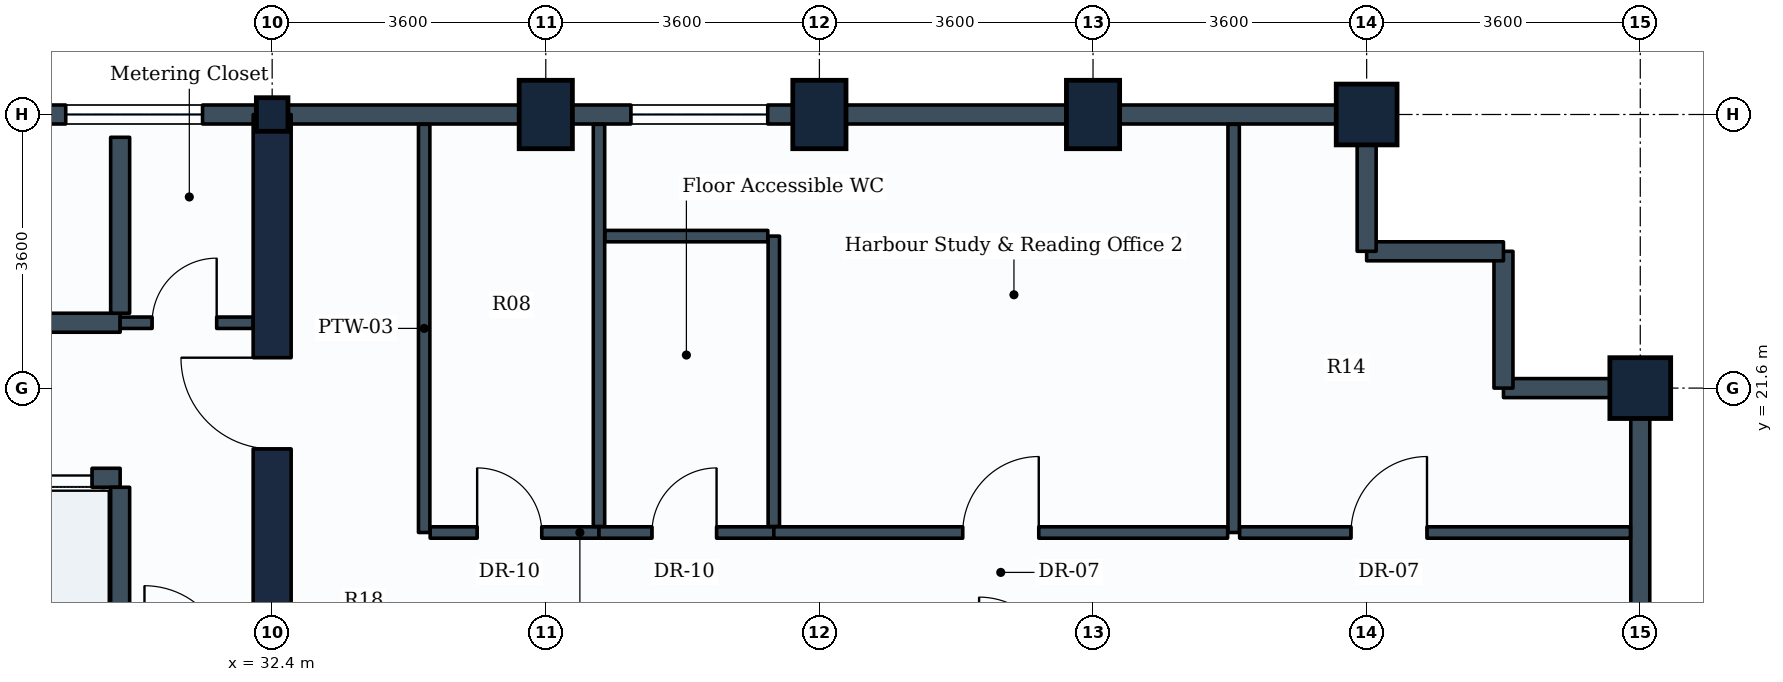
"""IFC4 building model, lengths in metres.
Left out: names, types, materials, properties, quantities, classifications, styles, units other than length and angle.
Written with IfcOpenShell. Run it as: python <this file> out.ifc"""

import sys

from ifc_helpers import new_model, si_unit, direction, frame, frame_2d, origin, origin_2d, place, context, subcontext, project, spatial, rectangle, i_section, extrude, element, fill, save


model = new_model("IFC4")
c1 = context("Model", 3, precision=1e-05, world=origin(), true_north=direction((0.0, 1.0)))
c2 = subcontext(c1, "Body", "Model", "MODEL_VIEW")
j1 = project(units=[si_unit("LENGTHUNIT", "METRE"), si_unit("PLANEANGLEUNIT", "RADIAN")], contexts=[c1])
p1 = place(None, origin())
s1 = spatial("IfcSite", under=j1, at=p1, CompositionType="ELEMENT")
p2 = place(p1, origin())
s2 = spatial("IfcBuilding", under=s1, at=p2, CompositionType="ELEMENT")
p3 = place(p2, frame((0.0, 0.0, 197.6)))
s3 = spatial("IfcBuildingStorey", under=s2, at=p3, CompositionType="ELEMENT", Elevation=197.6)
p4 = place(p3, frame((32.4, 25.2, 0.0), z_axis=(0.0, 0.0, 1.0), x_axis=(1.0, 0.0, 0.0)))
e1 = element("IfcColumn", 1, at=p4, inside=s3, PredefinedType="COLUMN", context=c2, shape_type="SweptSolid", body=[
    extrude(i_section(OverallWidth=0.416, OverallDepth=0.442, WebThickness=0.025, FlangeThickness=0.041, FilletRadius=0.015, at=origin_2d()), origin(), (0.0, 0.0, 1.0), 3.8),
])
for number, where, z_axis, x_axis in (
    (2, (36.0, 25.2, 0.0), (0.0, 0.0, 1.0), (1.0, 0.0, 0.0)),
    (3, (39.6, 25.2, 0.0), (0.0, 0.0, 1.0), (1.0, 0.0, 0.0)),
    (4, (43.2, 25.2, 0.0), (0.0, 0.0, 1.0), (1.0, 0.0, 0.0)),
):
    element("IfcColumn", number, at=place(p3, frame(where, z_axis=z_axis, x_axis=x_axis)), inside=s3, PredefinedType="COLUMN", context=c2, shape_type="SweptSolid", body=[
        extrude(rectangle(XDim=0.7, YDim=0.9, at=origin_2d()), origin(), (0.0, 0.0, 1.0), 3.8),
    ])
for number, where, z_axis, x_axis in (
    (5, (46.8, 25.2, 0.0), (0.0, 0.0, 1.0), (1.0, 0.0, 0.0)),
    (6, (50.4, 21.6, 0.0), (0.0, 0.0, 1.0), (0.0, 1.0, 0.0)),
):
    element("IfcColumn", number, at=place(p3, frame(where, z_axis=z_axis, x_axis=x_axis)), inside=s3, PredefinedType="COLUMN", context=c2, shape_type="SweptSolid", body=[
        extrude(rectangle(XDim=0.8, YDim=0.8, at=origin_2d()), origin(), (0.0, 0.0, 1.0), 3.8),
    ])
p5 = place(p3, frame((50.4, 21.6, 0.0), z_axis=(0.0, 0.0, 1.0), x_axis=(0.0, -1.0, 0.0)))
e7 = element("IfcWall", 7, at=p5, inside=s3, PredefinedType="STANDARD", context=c2, shape_type="SweptSolid", body=[
    extrude(rectangle(XDim=3.6, YDim=0.25, at=frame_2d((1.8, 0.0))), origin(), (0.0, 0.0, 1.0), 2.93),
])
p6 = place(p3, frame((48.6, 21.6, 0.0), z_axis=(0.0, 0.0, 1.0), x_axis=(1.0, 0.0, 0.0)))
e8 = element("IfcWall", 8, at=p6, inside=s3, PredefinedType="STANDARD", context=c2, shape_type="SweptSolid", body=[
    extrude(rectangle(XDim=1.8, YDim=0.25, at=frame_2d((0.9, 0.0))), origin(), (0.0, 0.0, 1.0), 2.93),
])
p7 = place(p3, frame((48.6, 23.4, 0.0), z_axis=(0.0, 0.0, 1.0), x_axis=(0.0, -1.0, 0.0)))
e9 = element("IfcWall", 9, at=p7, inside=s3, PredefinedType="STANDARD", context=c2, shape_type="SweptSolid", body=[
    extrude(rectangle(XDim=1.8, YDim=0.25, at=frame_2d((0.9, 0.0))), origin(), (0.0, 0.0, 1.0), 3.535),
])
p8 = place(p3, frame((46.8, 23.4, 0.0), z_axis=(0.0, 0.0, 1.0), x_axis=(1.0, 0.0, 0.0)))
e10 = element("IfcWall", 10, at=p8, inside=s3, PredefinedType="STANDARD", context=c2, shape_type="SweptSolid", body=[
    extrude(rectangle(XDim=1.8, YDim=0.25, at=frame_2d((0.9, 0.0))), origin(), (0.0, 0.0, 1.0), 3.535),
])
p9 = place(p3, frame((46.8, 25.2, 0.0), z_axis=(0.0, 0.0, 1.0), x_axis=(0.0, -1.0, 0.0)))
e11 = element("IfcWall", 11, at=p9, inside=s3, PredefinedType="STANDARD", context=c2, shape_type="SweptSolid", body=[
    extrude(rectangle(XDim=1.8, YDim=0.25, at=frame_2d((0.9, 0.0))), origin(), (0.0, 0.0, 1.0), 2.93),
])
p10 = place(p3, frame((43.2, 25.2, 0.0), z_axis=(0.0, 0.0, 1.0), x_axis=(1.0, 0.0, 0.0)))
e12 = element("IfcWall", 12, at=p10, inside=s3, PredefinedType="STANDARD", context=c2, shape_type="SweptSolid", body=[
    extrude(rectangle(XDim=3.6, YDim=0.25, at=frame_2d((1.8, 0.0))), origin(), (0.0, 0.0, 1.0), 2.93),
])
p11 = place(p3, frame((39.6, 25.2, 0.0), z_axis=(0.0, 0.0, 1.0), x_axis=(1.0, 0.0, 0.0)))
e13 = element("IfcWall", 13, at=p11, inside=s3, PredefinedType="STANDARD", context=c2, shape_type="SweptSolid", body=[
    extrude(rectangle(XDim=3.6, YDim=0.25, at=frame_2d((1.8, 0.0))), origin(), (0.0, 0.0, 1.0), 2.93),
])
p12 = place(p3, frame((36.0, 25.2, 0.0), z_axis=(0.0, 0.0, 1.0), x_axis=(1.0, 0.0, 0.0)))
e14 = element("IfcWall", 14, at=p12, inside=s3, PredefinedType="STANDARD", context=c2, shape_type="SweptSolid", body=[
    extrude(rectangle(XDim=3.6, YDim=0.25, at=frame_2d((1.8, 0.0))), origin(), (0.0, 0.0, 1.0), 2.93),
])
p13 = place(p12, frame((1.12, 0.0, 0.85)))
e15 = element("IfcOpeningElement", 15, at=p13, cuts=e14, PredefinedType="OPENING", context=c2, shape_type="SweptSolid", body=[
    extrude(rectangle(XDim=1.8, YDim=1.35, at=frame_2d((0.9, 0.675))), frame((0.0, 0.135, 0.0), z_axis=(0.0, -1.0, 0.0), x_axis=(1.0, 0.0, 0.0)), (0.0, 0.0, 1.0), 0.27),
])
p14 = place(p3, frame((32.4, 25.2, 0.0), z_axis=(0.0, 0.0, 1.0), x_axis=(1.0, 0.0, 0.0)))
e16 = element("IfcWall", 16, at=p14, inside=s3, PredefinedType="STANDARD", context=c2, shape_type="SweptSolid", body=[
    extrude(rectangle(XDim=3.6, YDim=0.25, at=frame_2d((1.8, 0.0))), origin(), (0.0, 0.0, 1.0), 2.93),
])
p15 = place(p3, frame((28.8, 25.2, 0.0), z_axis=(0.0, 0.0, 1.0), x_axis=(1.0, 0.0, 0.0)))
e17 = element("IfcWall", 17, at=p15, inside=s3, PredefinedType="STANDARD", context=c2, shape_type="SweptSolid", body=[
    extrude(rectangle(XDim=3.6, YDim=0.25, at=frame_2d((1.8, 0.0))), origin(), (0.0, 0.0, 1.0), 2.93),
])
p16 = place(p15, frame((0.884, 0.0, 0.85)))
e18 = element("IfcOpeningElement", 18, at=p16, cuts=e17, PredefinedType="OPENING", context=c2, shape_type="SweptSolid", body=[
    extrude(rectangle(XDim=1.8, YDim=1.35, at=frame_2d((0.9, 0.675))), frame((0.0, 0.135, 0.0), z_axis=(0.0, -1.0, 0.0), x_axis=(1.0, 0.0, 0.0)), (0.0, 0.0, 1.0), 0.27),
])
p17 = place(p3, frame((32.4, 10.8, 0.0), z_axis=(0.0, 0.0, 1.0), x_axis=(0.0, 1.0, 0.0)))
e19 = element("IfcWall", 19, at=p17, inside=s3, PredefinedType="SHEAR", context=c2, shape_type="SweptSolid", body=[
    extrude(rectangle(XDim=14.4, YDim=0.5, at=frame_2d((7.2, 0.0))), origin(), (0.0, 0.0, 1.0), 3.55),
])
p18 = place(p17, frame((4.35, 0.0, 0.0)))
e20 = element("IfcOpeningElement", 20, at=p18, cuts=e19, PredefinedType="OPENING", context=c2, shape_type="SweptSolid", body=[
    extrude(rectangle(XDim=1.2, YDim=2.1, at=frame_2d((0.6, 1.05))), frame((0.0, 0.26, 0.0), z_axis=(0.0, -1.0, 0.0), x_axis=(1.0, 0.0, 0.0)), (0.0, 0.0, 1.0), 0.52),
])
p19 = place(p17, frame((10.0, 0.0, 0.0)))
e21 = element("IfcOpeningElement", 21, at=p19, cuts=e19, PredefinedType="OPENING", context=c2, shape_type="SweptSolid", body=[
    extrude(rectangle(XDim=1.2, YDim=2.1, at=frame_2d((0.6, 1.05))), frame((0.0, 0.26, 0.0), z_axis=(0.0, -1.0, 0.0), x_axis=(1.0, 0.0, 0.0)), (0.0, 0.0, 1.0), 0.52),
])
p20 = place(p3, frame((23.18, 20.42, 0.0), z_axis=(0.0, 0.0, 1.0), x_axis=(1.0, 0.0, 0.0)))
e22 = element("IfcWall", 22, at=p20, inside=s3, PredefinedType="PARTITIONING", context=c2, shape_type="SweptSolid", body=[
    extrude(rectangle(XDim=7.22, YDim=0.25, at=frame_2d((3.61, 0.0))), origin(), (0.0, 0.0, 1.0), 3.535),
])
p21 = place(p20, frame((0.41, 0.0, 0.0)))
e23 = element("IfcOpeningElement", 23, at=p21, cuts=e22, PredefinedType="OPENING", context=c2, shape_type="SweptSolid", body=[
    extrude(rectangle(XDim=1.1, YDim=2.1, at=frame_2d((0.55, 1.05))), frame((0.0, 0.135, 0.0), z_axis=(0.0, -1.0, 0.0), x_axis=(1.0, 0.0, 0.0)), (0.0, 0.0, 1.0), 0.27),
])
p22 = place(p20, frame((2.19, 0.0, 0.0)))
e24 = element("IfcOpeningElement", 24, at=p22, cuts=e22, PredefinedType="OPENING", context=c2, shape_type="SweptSolid", body=[
    extrude(rectangle(XDim=1.1, YDim=2.1, at=frame_2d((0.55, 1.05))), frame((0.0, 0.135, 0.0), z_axis=(0.0, -1.0, 0.0), x_axis=(1.0, 0.0, 0.0)), (0.0, 0.0, 1.0), 0.27),
])
p23 = place(p20, frame((3.97, 0.0, 0.0)))
e25 = element("IfcOpeningElement", 25, at=p23, cuts=e22, PredefinedType="OPENING", context=c2, shape_type="SweptSolid", body=[
    extrude(rectangle(XDim=1.1, YDim=2.1, at=frame_2d((0.55, 1.05))), frame((0.0, 0.135, 0.0), z_axis=(0.0, -1.0, 0.0), x_axis=(1.0, 0.0, 0.0)), (0.0, 0.0, 1.0), 0.27),
])
p24 = place(p20, frame((5.75, 0.0, 0.0)))
e26 = element("IfcOpeningElement", 26, at=p24, cuts=e22, PredefinedType="OPENING", context=c2, shape_type="SweptSolid", body=[
    extrude(rectangle(XDim=1.1, YDim=2.1, at=frame_2d((0.55, 1.05))), frame((0.0, 0.135, 0.0), z_axis=(0.0, -1.0, 0.0), x_axis=(1.0, 0.0, 0.0)), (0.0, 0.0, 1.0), 0.27),
])
p25 = place(p3, frame((30.4, 18.025, 0.0), z_axis=(0.0, 0.0, 1.0), x_axis=(0.0, 1.0, 0.0)))
e27 = element("IfcWall", 27, at=p25, inside=s3, PredefinedType="PARTITIONING", context=c2, shape_type="SweptSolid", body=[
    extrude(rectangle(XDim=2.27, YDim=0.25, at=frame_2d((1.135, 0.0))), origin(), (0.0, 0.0, 1.0), 3.535),
])
p26 = place(p3, frame((23.18, 22.46, 0.0), z_axis=(0.0, 0.0, 1.0), x_axis=(1.0, 0.0, 0.0)))
e28 = element("IfcWall", 28, at=p26, inside=s3, PredefinedType="PARTITIONING", context=c2, shape_type="SweptSolid", body=[
    extrude(rectangle(XDim=7.22, YDim=0.25, at=frame_2d((3.61, 0.0))), origin(), (0.0, 0.0, 1.0), 3.535),
])
p27 = place(p3, frame((30.4, 22.585, 0.0), z_axis=(0.0, 0.0, 1.0), x_axis=(0.0, 1.0, 0.0)))
e29 = element("IfcWall", 29, at=p27, inside=s3, PredefinedType="PARTITIONING", context=c2, shape_type="SweptSolid", body=[
    extrude(rectangle(XDim=2.315, YDim=0.25, at=frame_2d((1.157, 0.0))), origin(), (0.0, 0.0, 1.0), 3.535),
])
p28 = place(p3, frame((30.4, 22.46, 0.0), z_axis=(0.0, 0.0, 1.0), x_axis=(1.0, 0.0, 0.0)))
e30 = element("IfcWall", 30, at=p28, inside=s3, PredefinedType="PARTITIONING", context=c2, shape_type="SweptSolid", body=[
    extrude(rectangle(XDim=1.75, YDim=0.15, at=frame_2d((0.875, 0.0))), origin(), (0.0, 0.0, 1.0), 3.535),
])
p29 = place(p28, frame((0.42, 0.0, 0.0)))
e31 = element("IfcOpeningElement", 31, at=p29, cuts=e30, PredefinedType="OPENING", context=c2, shape_type="SweptSolid", body=[
    extrude(rectangle(XDim=0.85, YDim=2.1, at=frame_2d((0.425, 1.05))), frame((0.0, 0.085, 0.0), z_axis=(0.0, -1.0, 0.0), x_axis=(1.0, 0.0, 0.0)), (0.0, 0.0, 1.0), 0.17),
])
p30 = place(p3, frame((34.4, 19.7, 0.0), z_axis=(0.0, 0.0, 1.0), x_axis=(0.0, 1.0, 0.0)))
e32 = element("IfcWall", 32, at=p30, inside=s3, PredefinedType="PARTITIONING", context=c2, shape_type="SweptSolid", body=[
    extrude(rectangle(XDim=5.371, YDim=0.15, at=frame_2d((2.686, 0.0))), origin(), (0.0, 0.0, 1.0), 2.93),
])
p31 = place(p3, frame((34.479, 19.7, 0.0), z_axis=(0.0, 0.0, 1.0), x_axis=(1.0, 0.0, 0.0)))
e33 = element("IfcWall", 33, at=p31, inside=s3, PredefinedType="PARTITIONING", context=c2, shape_type="SweptSolid", body=[
    extrude(rectangle(XDim=2.221, YDim=0.15, at=frame_2d((1.11, 0.0))), origin(), (0.0, 0.0, 1.0), 3.22),
])
p32 = place(p31, frame((0.618, 0.0, 0.0)))
e34 = element("IfcOpeningElement", 34, at=p32, cuts=e33, PredefinedType="OPENING", context=c2, shape_type="SweptSolid", body=[
    extrude(rectangle(XDim=0.85, YDim=2.1, at=frame_2d((0.425, 1.05))), frame((0.0, 0.085, 0.0), z_axis=(0.0, -1.0, 0.0), x_axis=(1.0, 0.0, 0.0)), (0.0, 0.0, 1.0), 0.17),
])
p33 = place(p3, frame((36.7, 19.779, 0.0), z_axis=(0.0, 0.0, 1.0), x_axis=(0.0, 1.0, 0.0)))
e35 = element("IfcWall", 35, at=p33, inside=s3, PredefinedType="PARTITIONING", context=c2, shape_type="SweptSolid", body=[
    extrude(rectangle(XDim=5.292, YDim=0.15, at=frame_2d((2.646, 0.0))), origin(), (0.0, 0.0, 1.0), 2.93),
])
p34 = place(p3, frame((36.7, 19.7, 0.0), z_axis=(0.0, 0.0, 1.0), x_axis=(1.0, 0.0, 0.0)))
e36 = element("IfcWall", 36, at=p34, inside=s3, PredefinedType="PARTITIONING", context=c2, shape_type="SweptSolid", body=[
    extrude(rectangle(XDim=2.3, YDim=0.15, at=frame_2d((1.15, 0.0))), origin(), (0.0, 0.0, 1.0), 3.535),
])
p35 = place(p34, frame((0.697, 0.0, 0.0)))
e37 = element("IfcOpeningElement", 37, at=p35, cuts=e36, PredefinedType="OPENING", context=c2, shape_type="SweptSolid", body=[
    extrude(rectangle(XDim=0.85, YDim=2.1, at=frame_2d((0.425, 1.05))), frame((0.0, 0.085, 0.0), z_axis=(0.0, -1.0, 0.0), x_axis=(1.0, 0.0, 0.0)), (0.0, 0.0, 1.0), 0.17),
])
p36 = place(p3, frame((39.0, 19.779, 0.0), z_axis=(0.0, 0.0, 1.0), x_axis=(0.0, 1.0, 0.0)))
e38 = element("IfcWall", 38, at=p36, inside=s3, PredefinedType="PARTITIONING", context=c2, shape_type="SweptSolid", body=[
    extrude(rectangle(XDim=3.821, YDim=0.15, at=frame_2d((1.911, 0.0))), origin(), (0.0, 0.0, 1.0), 3.17),
])
p37 = place(p3, frame((36.779, 23.6, 0.0), z_axis=(0.0, 0.0, 1.0), x_axis=(1.0, 0.0, 0.0)))
e39 = element("IfcWall", 39, at=p37, inside=s3, PredefinedType="PARTITIONING", context=c2, shape_type="SweptSolid", body=[
    extrude(rectangle(XDim=2.142, YDim=0.15, at=frame_2d((1.071, 0.0))), origin(), (0.0, 0.0, 1.0), 3.535),
])
p38 = place(p3, frame((45.05, 19.7, 0.0), z_axis=(0.0, 0.0, 1.0), x_axis=(0.0, 1.0, 0.0)))
e40 = element("IfcWall", 40, at=p38, inside=s3, PredefinedType="PARTITIONING", context=c2, shape_type="SweptSolid", body=[
    extrude(rectangle(XDim=5.371, YDim=0.15, at=frame_2d((2.686, 0.0))), origin(), (0.0, 0.0, 1.0), 2.93),
])
p39 = place(p3, frame((39.0, 19.7, 0.0), z_axis=(0.0, 0.0, 1.0), x_axis=(1.0, 0.0, 0.0)))
e41 = element("IfcWall", 41, at=p39, inside=s3, PredefinedType="PARTITIONING", context=c2, shape_type="SweptSolid", body=[
    extrude(rectangle(XDim=5.971, YDim=0.15, at=frame_2d((2.985, 0.0))), origin(), (0.0, 0.0, 1.0), 3.17),
])
p40 = place(p39, frame((2.486, 0.0, 0.0)))
e42 = element("IfcOpeningElement", 42, at=p40, cuts=e41, PredefinedType="OPENING", context=c2, shape_type="SweptSolid", body=[
    extrude(rectangle(XDim=1.0, YDim=2.1, at=frame_2d((0.5, 1.05))), frame((0.0, 0.085, 0.0), z_axis=(0.0, -1.0, 0.0), x_axis=(1.0, 0.0, 0.0)), (0.0, 0.0, 1.0), 0.17),
])
p41 = place(p3, frame((45.129, 19.7, 0.0), z_axis=(0.0, 0.0, 1.0), x_axis=(1.0, 0.0, 0.0)))
e43 = element("IfcWall", 43, at=p41, inside=s3, PredefinedType="PARTITIONING", context=c2, shape_type="SweptSolid", body=[
    extrude(rectangle(XDim=5.142, YDim=0.15, at=frame_2d((2.571, 0.0))), origin(), (0.0, 0.0, 1.0), 2.93),
])
p42 = place(p41, frame((1.465, 0.0, 0.0)))
e44 = element("IfcOpeningElement", 44, at=p42, cuts=e43, PredefinedType="OPENING", context=c2, shape_type="SweptSolid", body=[
    extrude(rectangle(XDim=1.0, YDim=2.1, at=frame_2d((0.5, 1.05))), frame((0.0, 0.085, 0.0), z_axis=(0.0, -1.0, 0.0), x_axis=(1.0, 0.0, 0.0)), (0.0, 0.0, 1.0), 0.17),
])
p43 = place(p13, origin())
e45 = element("IfcWindow", 45, at=p43, inside=s3, PartitioningType="SINGLE_PANEL", PredefinedType="WINDOW", context=c2, shape_type="SweptSolid", body=[
    extrude(rectangle(XDim=1.8, YDim=1.35, at=frame_2d((0.9, 0.675))), frame((0.0, 0.03, 0.0), z_axis=(0.0, -1.0, 0.0), x_axis=(1.0, 0.0, 0.0)), (0.0, 0.0, 1.0), 0.06),
])
fill(e15, e45)
p44 = place(p16, origin())
e46 = element("IfcWindow", 46, at=p44, inside=s3, PartitioningType="SINGLE_PANEL", PredefinedType="WINDOW", context=c2, shape_type="SweptSolid", body=[
    extrude(rectangle(XDim=1.8, YDim=1.35, at=frame_2d((0.9, 0.675))), frame((0.0, 0.03, 0.0), z_axis=(0.0, -1.0, 0.0), x_axis=(1.0, 0.0, 0.0)), (0.0, 0.0, 1.0), 0.06),
])
fill(e18, e46)
p45 = place(p24, origin())
e47 = element("IfcDoor", 47, at=p45, inside=s3, OperationType="SLIDING_TO_LEFT", PredefinedType="DOOR", context=c2, shape_type="SweptSolid", body=[
    extrude(rectangle(XDim=1.1, YDim=2.1, at=frame_2d((0.55, 1.05))), frame((0.0, 0.025, 0.0), z_axis=(0.0, -1.0, 0.0), x_axis=(1.0, 0.0, 0.0)), (0.0, 0.0, 1.0), 0.05),
])
fill(e26, e47)
p46 = place(p19, origin())
e48 = element("IfcDoor", 48, at=p46, inside=s3, OperationType="SINGLE_SWING_RIGHT", PredefinedType="DOOR", context=c2, shape_type="SweptSolid", body=[
    extrude(rectangle(XDim=1.2, YDim=2.1, at=frame_2d((0.6, 1.05))), frame((0.0, 0.025, 0.0), z_axis=(0.0, -1.0, 0.0), x_axis=(1.0, 0.0, 0.0)), (0.0, 0.0, 1.0), 0.05),
])
fill(e21, e48)
p47 = place(p29, origin())
e49 = element("IfcDoor", 49, at=p47, inside=s3, OperationType="SINGLE_SWING_RIGHT", PredefinedType="DOOR", context=c2, shape_type="SweptSolid", body=[
    extrude(rectangle(XDim=0.85, YDim=2.1, at=frame_2d((0.425, 1.05))), frame((0.0, 0.025, 0.0), z_axis=(0.0, -1.0, 0.0), x_axis=(1.0, 0.0, 0.0)), (0.0, 0.0, 1.0), 0.05),
])
fill(e31, e49)
p48 = place(p32, origin())
e50 = element("IfcDoor", 50, at=p48, inside=s3, OperationType="SINGLE_SWING_LEFT", PredefinedType="DOOR", context=c2, shape_type="SweptSolid", body=[
    extrude(rectangle(XDim=0.85, YDim=2.1, at=frame_2d((0.425, 1.05))), frame((0.0, 0.025, 0.0), z_axis=(0.0, -1.0, 0.0), x_axis=(1.0, 0.0, 0.0)), (0.0, 0.0, 1.0), 0.05),
])
fill(e34, e50)
p49 = place(p35, origin())
e51 = element("IfcDoor", 51, at=p49, inside=s3, OperationType="SINGLE_SWING_RIGHT", PredefinedType="DOOR", context=c2, shape_type="SweptSolid", body=[
    extrude(rectangle(XDim=0.85, YDim=2.1, at=frame_2d((0.425, 1.05))), frame((0.0, 0.025, 0.0), z_axis=(0.0, -1.0, 0.0), x_axis=(1.0, 0.0, 0.0)), (0.0, 0.0, 1.0), 0.05),
])
fill(e37, e51)
p50 = place(p40, origin())
e52 = element("IfcDoor", 52, at=p50, inside=s3, OperationType="SINGLE_SWING_RIGHT", PredefinedType="DOOR", context=c2, shape_type="SweptSolid", body=[
    extrude(rectangle(XDim=1.0, YDim=2.1, at=frame_2d((0.5, 1.05))), frame((0.0, 0.025, 0.0), z_axis=(0.0, -1.0, 0.0), x_axis=(1.0, 0.0, 0.0)), (0.0, 0.0, 1.0), 0.05),
])
fill(e42, e52)
p51 = place(p42, origin())
e53 = element("IfcDoor", 53, at=p51, inside=s3, OperationType="SINGLE_SWING_RIGHT", PredefinedType="DOOR", context=c2, shape_type="SweptSolid", body=[
    extrude(rectangle(XDim=1.0, YDim=2.1, at=frame_2d((0.5, 1.05))), frame((0.0, 0.025, 0.0), z_axis=(0.0, -1.0, 0.0), x_axis=(1.0, 0.0, 0.0)), (0.0, 0.0, 1.0), 0.05),
])
fill(e44, e53)
save(model, sys.argv[1])
